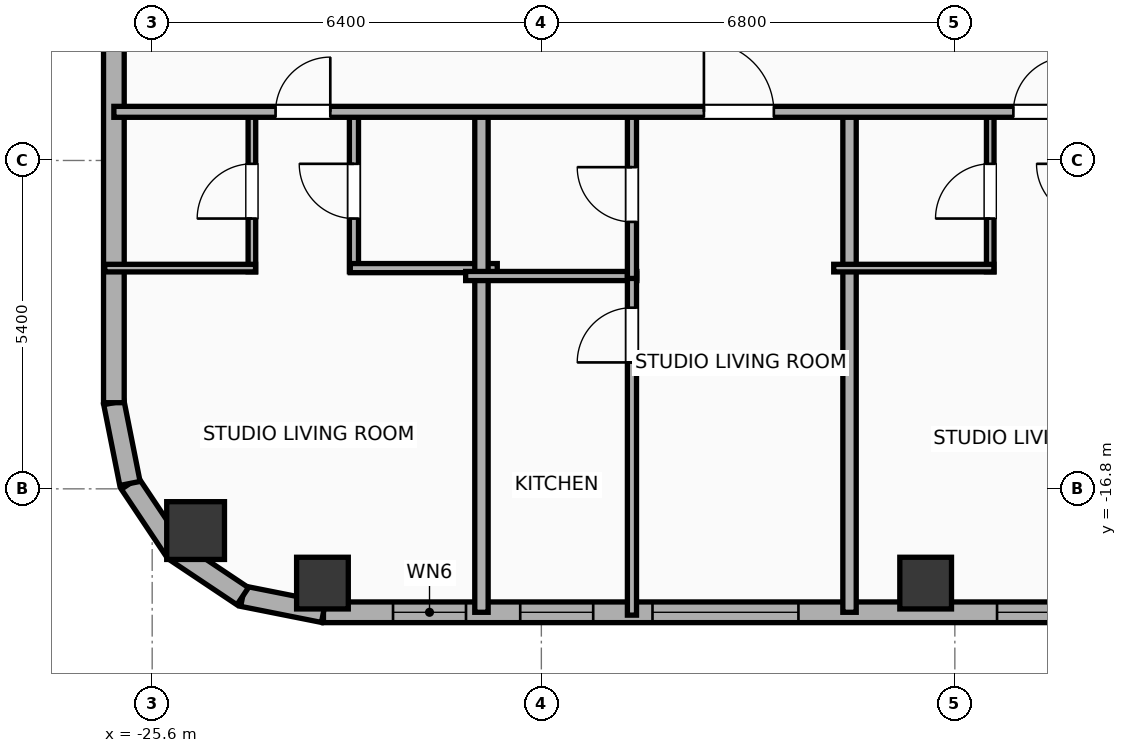
"""IFC4 building model, lengths in metres.
Left out: names, types, materials, properties, quantities, classifications, styles, units other than length and angle.
Written with IfcOpenShell. Run it as: python <this file> out.ifc"""

import sys

from ifc_helpers import new_model, si_unit, direction, frame, frame_2d, origin, origin_2d, place, context, subcontext, project, spatial, rectangle, hollow_rectangle, hollow_circle, extrude, element, fill, save


model = new_model("IFC4")
c1 = context("Model", 3, precision=1e-05, world=origin(), true_north=direction((0.0, 1.0)))
c2 = subcontext(c1, "Body", "Model", "MODEL_VIEW")
j1 = project(units=[si_unit("LENGTHUNIT", "METRE"), si_unit("PLANEANGLEUNIT", "RADIAN")], contexts=[c1])
p1 = place(None, origin())
s1 = spatial("IfcSite", under=j1, at=p1, CompositionType="ELEMENT")
p2 = place(p1, origin())
s2 = spatial("IfcBuilding", under=s1, at=p2, CompositionType="ELEMENT")
p3 = place(p2, frame((0.0, 0.0, 247.0)))
s3 = spatial("IfcBuildingStorey", under=s2, at=p3, CompositionType="ELEMENT", Elevation=247.0)
for number, where, z_axis, x_axis in (
    (1, (-22.8, -18.35, 0.0), (0.0, 0.0, 1.0), (1.0, 0.0, 0.0)),
    (2, (-12.88, -18.35, 0.0), (0.0, 0.0, 1.0), (1.0, 0.0, 0.0)),
):
    element("IfcColumn", number, at=place(p3, frame(where, z_axis=z_axis, x_axis=x_axis)), inside=s3, PredefinedType="COLUMN", context=c2, shape_type="SweptSolid", body=[
        extrude(hollow_rectangle(XDim=0.85, YDim=0.85, WallThickness=0.028, at=origin_2d()), origin(), (0.0, 0.0, 1.0), 3.9),
    ])
p4 = place(p3, frame((-24.886, -17.486, 0.0), z_axis=(0.0, 0.0, 1.0), x_axis=(1.0, 0.0, 0.0)))
e3 = element("IfcColumn", 3, at=p4, inside=s3, PredefinedType="COLUMN", context=c2, shape_type="SweptSolid", body=[
    extrude(hollow_circle(Radius=0.475, WallThickness=0.032, at=origin_2d()), origin(), (0.0, 0.0, 1.0), 3.9),
])
p5 = place(p3, frame((26.783, -18.83, 0.0), z_axis=(0.0, 0.0, 1.0), x_axis=(-1.0, 0.0, 0.0)))
e4 = element("IfcWall", 4, at=p5, inside=s3, PredefinedType="ELEMENTEDWALL", context=c2, shape_type="SweptSolid", body=[
    extrude(rectangle(XDim=49.566, YDim=0.34, at=frame_2d((24.783, 0.0))), origin(), (0.0, 0.0, 1.0), 3.65),
])
p6 = place(p5, frame((23.583, 0.0, 0.75)))
e5 = element("IfcOpeningElement", 5, at=p6, cuts=e4, PredefinedType="OPENING", context=c2, shape_type="SweptSolid", body=[
    extrude(rectangle(XDim=2.4, YDim=2.1, at=frame_2d((1.2, 1.05))), frame((0.0, 0.18, 0.0), z_axis=(0.0, -1.0, 0.0), x_axis=(1.0, 0.0, 0.0)), (0.0, 0.0, 1.0), 0.36),
])
p7 = place(p5, frame((41.756, 0.0, 0.75)))
e6 = element("IfcOpeningElement", 6, at=p7, cuts=e4, PredefinedType="OPENING", context=c2, shape_type="SweptSolid", body=[
    extrude(rectangle(XDim=2.4, YDim=2.1, at=frame_2d((1.2, 1.05))), frame((0.0, 0.18, 0.0), z_axis=(0.0, -1.0, 0.0), x_axis=(1.0, 0.0, 0.0)), (0.0, 0.0, 1.0), 0.36),
])
p8 = place(p5, frame((47.222, 0.0, 0.75)))
e7 = element("IfcOpeningElement", 7, at=p8, cuts=e4, PredefinedType="OPENING", context=c2, shape_type="SweptSolid", body=[
    extrude(rectangle(XDim=1.2, YDim=2.05, at=frame_2d((0.6, 1.025))), frame((0.0, 0.18, 0.0), z_axis=(0.0, -1.0, 0.0), x_axis=(1.0, 0.0, 0.0)), (0.0, 0.0, 1.0), 0.36),
])
p9 = place(p5, frame((45.131, 0.0, 0.75)))
e8 = element("IfcOpeningElement", 8, at=p9, cuts=e4, PredefinedType="OPENING", context=c2, shape_type="SweptSolid", body=[
    extrude(rectangle(XDim=1.2, YDim=2.05, at=frame_2d((0.6, 1.025))), frame((0.0, 0.18, 0.0), z_axis=(0.0, -1.0, 0.0), x_axis=(1.0, 0.0, 0.0)), (0.0, 0.0, 1.0), 0.36),
])
p10 = place(p5, frame((37.289, 0.0, 0.75)))
e9 = element("IfcOpeningElement", 9, at=p10, cuts=e4, PredefinedType="OPENING", context=c2, shape_type="SweptSolid", body=[
    extrude(rectangle(XDim=1.2, YDim=2.05, at=frame_2d((0.6, 1.025))), frame((0.0, 0.18, 0.0), z_axis=(0.0, -1.0, 0.0), x_axis=(1.0, 0.0, 0.0)), (0.0, 0.0, 1.0), 0.36),
])
p11 = place(p5, frame((15.715, 0.0, 0.75)))
e10 = element("IfcOpeningElement", 10, at=p11, cuts=e4, PredefinedType="OPENING", context=c2, shape_type="SweptSolid", body=[
    extrude(rectangle(XDim=1.2, YDim=2.05, at=frame_2d((0.6, 1.025))), frame((0.0, 0.18, 0.0), z_axis=(0.0, -1.0, 0.0), x_axis=(1.0, 0.0, 0.0)), (0.0, 0.0, 1.0), 0.36),
])
p12 = place(p5, frame((12.022, 0.0, 0.75)))
e11 = element("IfcOpeningElement", 11, at=p12, cuts=e4, PredefinedType="OPENING", context=c2, shape_type="SweptSolid", body=[
    extrude(rectangle(XDim=1.2, YDim=2.05, at=frame_2d((0.6, 1.025))), frame((0.0, 0.18, 0.0), z_axis=(0.0, -1.0, 0.0), x_axis=(1.0, 0.0, 0.0)), (0.0, 0.0, 1.0), 0.36),
])
p13 = place(p5, frame((8.09, 0.0, 0.75)))
e12 = element("IfcOpeningElement", 12, at=p13, cuts=e4, PredefinedType="OPENING", context=c2, shape_type="SweptSolid", body=[
    extrude(rectangle(XDim=1.2, YDim=2.05, at=frame_2d((0.6, 1.025))), frame((0.0, 0.18, 0.0), z_axis=(0.0, -1.0, 0.0), x_axis=(1.0, 0.0, 0.0)), (0.0, 0.0, 1.0), 0.36),
])
p14 = place(p5, frame((4.637, 0.0, 0.75)))
e13 = element("IfcOpeningElement", 13, at=p14, cuts=e4, PredefinedType="OPENING", context=c2, shape_type="SweptSolid", body=[
    extrude(rectangle(XDim=1.2, YDim=2.05, at=frame_2d((0.6, 1.025))), frame((0.0, 0.18, 0.0), z_axis=(0.0, -1.0, 0.0), x_axis=(1.0, 0.0, 0.0)), (0.0, 0.0, 1.0), 0.36),
])
p15 = place(p5, frame((1.811, 0.0, 0.75)))
e14 = element("IfcOpeningElement", 14, at=p15, cuts=e4, PredefinedType="OPENING", context=c2, shape_type="SweptSolid", body=[
    extrude(rectangle(XDim=1.2, YDim=2.05, at=frame_2d((0.6, 1.025))), frame((0.0, 0.18, 0.0), z_axis=(0.0, -1.0, 0.0), x_axis=(1.0, 0.0, 0.0)), (0.0, 0.0, 1.0), 0.36),
])
p16 = place(p5, frame((32.253, 0.0, 0.75)))
e15 = element("IfcOpeningElement", 15, at=p16, cuts=e4, PredefinedType="OPENING", context=c2, shape_type="SweptSolid", body=[
    extrude(rectangle(XDim=1.2, YDim=2.05, at=frame_2d((0.6, 1.025))), frame((0.0, 0.18, 0.0), z_axis=(0.0, -1.0, 0.0), x_axis=(1.0, 0.0, 0.0)), (0.0, 0.0, 1.0), 0.36),
])
p17 = place(p5, frame((27.853, 0.0, 0.75)))
e16 = element("IfcOpeningElement", 16, at=p17, cuts=e4, PredefinedType="OPENING", context=c2, shape_type="SweptSolid", body=[
    extrude(rectangle(XDim=1.2, YDim=2.05, at=frame_2d((0.6, 1.025))), frame((0.0, 0.18, 0.0), z_axis=(0.0, -1.0, 0.0), x_axis=(1.0, 0.0, 0.0)), (0.0, 0.0, 1.0), 0.36),
])
p18 = place(p5, frame((20.473, 0.0, 0.75)))
e17 = element("IfcOpeningElement", 17, at=p18, cuts=e4, PredefinedType="OPENING", context=c2, shape_type="SweptSolid", body=[
    extrude(rectangle(XDim=1.2, YDim=2.05, at=frame_2d((0.6, 1.025))), frame((0.0, 0.18, 0.0), z_axis=(0.0, -1.0, 0.0), x_axis=(1.0, 0.0, 0.0)), (0.0, 0.0, 1.0), 0.36),
])
p19 = place(p3, frame((-22.783, -18.83, 0.0), z_axis=(0.0, 0.0, 1.0), x_axis=(-0.980788153188, 0.195075878998, 0.0)))
e18 = element("IfcWall", 18, at=p19, inside=s3, PredefinedType="ELEMENTEDWALL", context=c2, shape_type="SweptSolid", body=[
    extrude(rectangle(XDim=1.354, YDim=0.34, at=frame_2d((0.677, 0.0))), origin(), (0.0, 0.0, 1.0), 3.65),
])
p20 = place(p3, frame((-24.111, -18.566, 0.0), z_axis=(0.0, 0.0, 1.0), x_axis=(-0.831403586725, 0.555669034571, 0.0)))
e19 = element("IfcWall", 19, at=p20, inside=s3, PredefinedType="ELEMENTEDWALL", context=c2, shape_type="SweptSolid", body=[
    extrude(rectangle(XDim=1.337, YDim=0.34, at=frame_2d((0.668, 0.0))), origin(), (0.0, 0.0, 1.0), 3.65),
])
p21 = place(p3, frame((-25.223, -17.823, 0.0), z_axis=(0.0, 0.0, 1.0), x_axis=(-0.555584683399, 0.831459956686, 0.0)))
e20 = element("IfcWall", 20, at=p21, inside=s3, PredefinedType="ELEMENTEDWALL", context=c2, shape_type="SweptSolid", body=[
    extrude(rectangle(XDim=1.337, YDim=0.34, at=frame_2d((0.668, 0.0))), origin(), (0.0, 0.0, 1.0), 3.65),
])
p22 = place(p3, frame((-25.966, -16.711, 0.0), z_axis=(0.0, 0.0, 1.0), x_axis=(-0.195110379894, 0.98078129043, 0.0)))
e21 = element("IfcWall", 21, at=p22, inside=s3, PredefinedType="ELEMENTEDWALL", context=c2, shape_type="SweptSolid", body=[
    extrude(rectangle(XDim=1.354, YDim=0.34, at=frame_2d((0.677, 0.0))), origin(), (0.0, 0.0, 1.0), 3.65),
])
p23 = place(p3, frame((-26.23, -15.383, 0.0), z_axis=(0.0, 0.0, 1.0), x_axis=(0.0, 1.0, 0.0)))
e22 = element("IfcWall", 22, at=p23, inside=s3, PredefinedType="ELEMENTEDWALL", context=c2, shape_type="SweptSolid", body=[
    extrude(rectangle(XDim=31.967, YDim=0.34, at=frame_2d((15.983, 0.0))), origin(), (0.0, 0.0, 1.0), 3.65),
])
p24 = place(p23, frame((29.21, 0.0, 0.75)))
e23 = element("IfcOpeningElement", 23, at=p24, cuts=e22, PredefinedType="OPENING", context=c2, shape_type="SweptSolid", body=[
    extrude(rectangle(XDim=1.2, YDim=2.05, at=frame_2d((0.6, 1.025))), frame((0.0, 0.18, 0.0), z_axis=(0.0, -1.0, 0.0), x_axis=(1.0, 0.0, 0.0)), (0.0, 0.0, 1.0), 0.36),
])
p25 = place(p23, frame((19.378, 0.0, 0.75)))
e24 = element("IfcOpeningElement", 24, at=p25, cuts=e22, PredefinedType="OPENING", context=c2, shape_type="SweptSolid", body=[
    extrude(rectangle(XDim=1.2, YDim=2.05, at=frame_2d((0.6, 1.025))), frame((0.0, 0.18, 0.0), z_axis=(0.0, -1.0, 0.0), x_axis=(1.0, 0.0, 0.0)), (0.0, 0.0, 1.0), 0.36),
])
p26 = place(p23, frame((10.328, 0.0, 0.75)))
e25 = element("IfcOpeningElement", 25, at=p26, cuts=e22, PredefinedType="OPENING", context=c2, shape_type="SweptSolid", body=[
    extrude(rectangle(XDim=1.2, YDim=2.05, at=frame_2d((0.6, 1.025))), frame((0.0, 0.18, 0.0), z_axis=(0.0, -1.0, 0.0), x_axis=(1.0, 0.0, 0.0)), (0.0, 0.0, 1.0), 0.36),
])
p27 = place(p3, frame((-23.96, -13.23, 0.0), z_axis=(0.0, 0.0, 1.0), x_axis=(0.0, 1.0, 0.0)))
e26 = element("IfcWall", 26, at=p27, inside=s3, PredefinedType="PARTITIONING", context=c2, shape_type="SweptSolid", body=[
    extrude(rectangle(XDim=2.65, YDim=0.125, at=frame_2d((1.325, 0.0))), origin(), (0.0, 0.0, 1.0), 3.65),
])
p28 = place(p27, frame((0.875, 0.0, 0.0)))
e27 = element("IfcOpeningElement", 27, at=p28, cuts=e26, PredefinedType="OPENING", context=c2, shape_type="SweptSolid", body=[
    extrude(rectangle(XDim=0.9, YDim=2.05, at=frame_2d((0.45, 1.025))), frame((0.0, 0.073, 0.0), z_axis=(0.0, -1.0, 0.0), x_axis=(1.0, 0.0, 0.0)), (0.0, 0.0, 1.0), 0.145),
])
p29 = place(p3, frame((-22.282, -13.23, 0.0), z_axis=(0.0, 0.0, 1.0), x_axis=(0.0, 1.0, 0.0)))
e28 = element("IfcWall", 28, at=p29, inside=s3, PredefinedType="PLUMBINGWALL", context=c2, shape_type="SweptSolid", body=[
    extrude(rectangle(XDim=2.65, YDim=0.15, at=frame_2d((1.325, 0.0))), origin(), (0.0, 0.0, 1.0), 3.65),
])
p30 = place(p29, frame((0.875, 0.0, 0.0)))
e29 = element("IfcOpeningElement", 29, at=p30, cuts=e28, PredefinedType="OPENING", context=c2, shape_type="SweptSolid", body=[
    extrude(rectangle(XDim=0.9, YDim=2.05, at=frame_2d((0.45, 1.025))), frame((0.0, 0.085, 0.0), z_axis=(0.0, -1.0, 0.0), x_axis=(1.0, 0.0, 0.0)), (0.0, 0.0, 1.0), 0.17),
])
p31 = place(p3, frame((-26.38, -13.17, 0.0), z_axis=(0.0, 0.0, 1.0), x_axis=(1.0, 0.0, 0.0)))
e30 = element("IfcWall", 30, at=p31, inside=s3, PredefinedType="PARTITIONING", context=c2, shape_type="SweptSolid", body=[
    extrude(rectangle(XDim=2.48, YDim=0.125, at=frame_2d((1.24, 0.0))), origin(), (0.0, 0.0, 1.0), 3.65),
])
p32 = place(p3, frame((-22.342, -13.17, 0.0), z_axis=(0.0, 0.0, 1.0), x_axis=(1.0, 0.0, 0.0)))
e31 = element("IfcWall", 31, at=p32, inside=s3, PredefinedType="PLUMBINGWALL", context=c2, shape_type="SweptSolid", body=[
    extrude(rectangle(XDim=2.417, YDim=0.15, at=frame_2d((1.208, 0.0))), origin(), (0.0, 0.0, 1.0), 3.65),
])
p33 = place(p3, frame((-20.185, -18.83, 0.0), z_axis=(0.0, 0.0, 1.0), x_axis=(0.0, 1.0, 0.0)))
e32 = element("IfcWall", 32, at=p33, inside=s3, PredefinedType="PARTITIONING", context=c2, shape_type="SweptSolid", body=[
    extrude(rectangle(XDim=8.31, YDim=0.22, at=frame_2d((4.155, 0.0))), origin(), (0.0, 0.0, 1.0), 3.09),
])
p34 = place(p3, frame((-20.445, -13.3, 0.0), z_axis=(0.0, 0.0, 1.0), x_axis=(1.0, 0.0, 0.0)))
e33 = element("IfcWall", 33, at=p34, inside=s3, PredefinedType="PLUMBINGWALL", context=c2, shape_type="SweptSolid", body=[
    extrude(rectangle(XDim=2.815, YDim=0.15, at=frame_2d((1.408, 0.0))), origin(), (0.0, 0.0, 1.0), 3.65),
])
p35 = place(p3, frame((-17.71, -18.877, 0.0), z_axis=(0.0, 0.0, 1.0), x_axis=(0.0, 1.0, 0.0)))
e34 = element("IfcWall", 34, at=p35, inside=s3, PredefinedType="PLUMBINGWALL", context=c2, shape_type="SweptSolid", body=[
    extrude(rectangle(XDim=5.617, YDim=0.15, at=frame_2d((2.808, 0.0))), origin(), (0.0, 0.0, 1.0), 3.65),
])
p36 = place(p35, frame((4.156, 0.0, 0.0)))
e35 = element("IfcOpeningElement", 35, at=p36, cuts=e34, PredefinedType="OPENING", context=c2, shape_type="SweptSolid", body=[
    extrude(rectangle(XDim=0.9, YDim=2.05, at=frame_2d((0.45, 1.025))), frame((0.0, 0.085, 0.0), z_axis=(0.0, -1.0, 0.0), x_axis=(1.0, 0.0, 0.0)), (0.0, 0.0, 1.0), 0.17),
])
p37 = place(p3, frame((-17.71, -13.34, 0.0), z_axis=(0.0, 0.0, 1.0), x_axis=(0.0, 1.0, 0.0)))
e36 = element("IfcWall", 36, at=p37, inside=s3, PredefinedType="PLUMBINGWALL", context=c2, shape_type="SweptSolid", body=[
    extrude(rectangle(XDim=2.76, YDim=0.15, at=frame_2d((1.38, 0.0))), origin(), (0.0, 0.0, 1.0), 3.65),
])
p38 = place(p37, frame((0.93, 0.0, 0.0)))
e37 = element("IfcOpeningElement", 37, at=p38, cuts=e36, PredefinedType="OPENING", context=c2, shape_type="SweptSolid", body=[
    extrude(rectangle(XDim=0.9, YDim=2.05, at=frame_2d((0.45, 1.025))), frame((0.0, 0.085, 0.0), z_axis=(0.0, -1.0, 0.0), x_axis=(1.0, 0.0, 0.0)), (0.0, 0.0, 1.0), 0.17),
])
p39 = place(p3, frame((-14.132, -18.83, 0.0), z_axis=(0.0, 0.0, 1.0), x_axis=(0.0, 1.0, 0.0)))
e38 = element("IfcWall", 38, at=p39, inside=s3, PredefinedType="PARTITIONING", context=c2, shape_type="SweptSolid", body=[
    extrude(rectangle(XDim=8.31, YDim=0.22, at=frame_2d((4.155, 0.0))), origin(), (0.0, 0.0, 1.0), 3.65),
])
p40 = place(p3, frame((-11.818, -13.23, 0.0), z_axis=(0.0, 0.0, 1.0), x_axis=(0.0, 1.0, 0.0)))
e39 = element("IfcWall", 39, at=p40, inside=s3, PredefinedType="PARTITIONING", context=c2, shape_type="SweptSolid", body=[
    extrude(rectangle(XDim=2.65, YDim=0.125, at=frame_2d((1.325, 0.0))), origin(), (0.0, 0.0, 1.0), 3.65),
])
p41 = place(p40, frame((0.875, 0.0, 0.0)))
e40 = element("IfcOpeningElement", 40, at=p41, cuts=e39, PredefinedType="OPENING", context=c2, shape_type="SweptSolid", body=[
    extrude(rectangle(XDim=0.9, YDim=2.05, at=frame_2d((0.45, 1.025))), frame((0.0, 0.073, 0.0), z_axis=(0.0, -1.0, 0.0), x_axis=(1.0, 0.0, 0.0)), (0.0, 0.0, 1.0), 0.145),
])
p42 = place(p3, frame((-14.392, -13.17, 0.0), z_axis=(0.0, 0.0, 1.0), x_axis=(1.0, 0.0, 0.0)))
e41 = element("IfcWall", 41, at=p42, inside=s3, PredefinedType="PARTITIONING", context=c2, shape_type="SweptSolid", body=[
    extrude(rectangle(XDim=2.634, YDim=0.125, at=frame_2d((1.317, 0.0))), origin(), (0.0, 0.0, 1.0), 3.65),
])
p43 = place(p3, frame((-26.23, -10.6, 0.0), z_axis=(0.0, 0.0, 1.0), x_axis=(1.0, 0.0, 0.0)))
e42 = element("IfcWall", 42, at=p43, inside=s3, PredefinedType="PARTITIONING", context=c2, shape_type="SweptSolid", body=[
    extrude(rectangle(XDim=18.15, YDim=0.18, at=frame_2d((9.075, 0.0))), origin(), (0.0, 0.0, 1.0), 3.65),
])
p44 = place(p43, frame((2.659, 0.0, 0.0)))
e43 = element("IfcOpeningElement", 43, at=p44, cuts=e42, PredefinedType="OPENING", context=c2, shape_type="SweptSolid", body=[
    extrude(rectangle(XDim=0.9, YDim=2.05, at=frame_2d((0.45, 1.025))), frame((0.0, 0.1, 0.0), z_axis=(0.0, -1.0, 0.0), x_axis=(1.0, 0.0, 0.0)), (0.0, 0.0, 1.0), 0.2),
])
p45 = place(p43, frame((9.703, 0.0, 0.0)))
e44 = element("IfcOpeningElement", 44, at=p45, cuts=e42, PredefinedType="OPENING", context=c2, shape_type="SweptSolid", body=[
    extrude(rectangle(XDim=1.15, YDim=2.05, at=frame_2d((0.575, 1.025))), frame((0.0, 0.1, 0.0), z_axis=(0.0, -1.0, 0.0), x_axis=(1.0, 0.0, 0.0)), (0.0, 0.0, 1.0), 0.2),
])
p46 = place(p43, frame((14.792, 0.0, 0.0)))
e45 = element("IfcOpeningElement", 45, at=p46, cuts=e42, PredefinedType="OPENING", context=c2, shape_type="SweptSolid", body=[
    extrude(rectangle(XDim=0.9, YDim=2.05, at=frame_2d((0.45, 1.025))), frame((0.0, 0.1, 0.0), z_axis=(0.0, -1.0, 0.0), x_axis=(1.0, 0.0, 0.0)), (0.0, 0.0, 1.0), 0.2),
])
p47 = place(p7, origin())
e46 = element("IfcWindow", 46, at=p47, inside=s3, PartitioningType="SINGLE_PANEL", PredefinedType="WINDOW", context=c2, shape_type="SweptSolid", body=[
    extrude(rectangle(XDim=2.4, YDim=2.1, at=frame_2d((1.2, 1.05))), frame((0.0, 0.03, 0.0), z_axis=(0.0, -1.0, 0.0), x_axis=(1.0, 0.0, 0.0)), (0.0, 0.0, 1.0), 0.06),
])
fill(e6, e46)
p48 = place(p8, origin())
e47 = element("IfcWindow", 47, at=p48, inside=s3, PartitioningType="SINGLE_PANEL", PredefinedType="WINDOW", context=c2, shape_type="SweptSolid", body=[
    extrude(rectangle(XDim=1.2, YDim=2.05, at=frame_2d((0.6, 1.025))), frame((0.0, 0.03, 0.0), z_axis=(0.0, -1.0, 0.0), x_axis=(1.0, 0.0, 0.0)), (0.0, 0.0, 1.0), 0.06),
])
fill(e7, e47)
p49 = place(p9, origin())
e48 = element("IfcWindow", 48, at=p49, inside=s3, PartitioningType="SINGLE_PANEL", PredefinedType="WINDOW", context=c2, shape_type="SweptSolid", body=[
    extrude(rectangle(XDim=1.2, YDim=2.05, at=frame_2d((0.6, 1.025))), frame((0.0, 0.03, 0.0), z_axis=(0.0, -1.0, 0.0), x_axis=(1.0, 0.0, 0.0)), (0.0, 0.0, 1.0), 0.06),
])
fill(e8, e48)
p50 = place(p10, origin())
e49 = element("IfcWindow", 49, at=p50, inside=s3, PartitioningType="SINGLE_PANEL", PredefinedType="WINDOW", context=c2, shape_type="SweptSolid", body=[
    extrude(rectangle(XDim=1.2, YDim=2.05, at=frame_2d((0.6, 1.025))), frame((0.0, 0.03, 0.0), z_axis=(0.0, -1.0, 0.0), x_axis=(1.0, 0.0, 0.0)), (0.0, 0.0, 1.0), 0.06),
])
fill(e9, e49)
p51 = place(p28, origin())
e50 = element("IfcDoor", 50, at=p51, inside=s3, OperationType="SINGLE_SWING_LEFT", PredefinedType="DOOR", context=c2, shape_type="SweptSolid", body=[
    extrude(rectangle(XDim=0.9, YDim=2.05, at=frame_2d((0.45, 1.025))), frame((0.0, 0.025, 0.0), z_axis=(0.0, -1.0, 0.0), x_axis=(1.0, 0.0, 0.0)), (0.0, 0.0, 1.0), 0.05),
])
fill(e27, e50)
p52 = place(p30, origin())
e51 = element("IfcDoor", 51, at=p52, inside=s3, OperationType="SINGLE_SWING_RIGHT", PredefinedType="DOOR", context=c2, shape_type="SweptSolid", body=[
    extrude(rectangle(XDim=0.9, YDim=2.05, at=frame_2d((0.45, 1.025))), frame((0.0, 0.025, 0.0), z_axis=(0.0, -1.0, 0.0), x_axis=(1.0, 0.0, 0.0)), (0.0, 0.0, 1.0), 0.05),
])
fill(e29, e51)
p53 = place(p36, origin())
e52 = element("IfcDoor", 52, at=p53, inside=s3, OperationType="SINGLE_SWING_LEFT", PredefinedType="DOOR", context=c2, shape_type="SweptSolid", body=[
    extrude(rectangle(XDim=0.9, YDim=2.05, at=frame_2d((0.45, 1.025))), frame((0.0, 0.025, 0.0), z_axis=(0.0, -1.0, 0.0), x_axis=(1.0, 0.0, 0.0)), (0.0, 0.0, 1.0), 0.05),
])
fill(e35, e52)
p54 = place(p38, origin())
e53 = element("IfcDoor", 53, at=p54, inside=s3, OperationType="SINGLE_SWING_RIGHT", PredefinedType="DOOR", context=c2, shape_type="SweptSolid", body=[
    extrude(rectangle(XDim=0.9, YDim=2.05, at=frame_2d((0.45, 1.025))), frame((0.0, 0.025, 0.0), z_axis=(0.0, -1.0, 0.0), x_axis=(1.0, 0.0, 0.0)), (0.0, 0.0, 1.0), 0.05),
])
fill(e37, e53)
p55 = place(p41, origin())
e54 = element("IfcDoor", 54, at=p55, inside=s3, OperationType="SINGLE_SWING_LEFT", PredefinedType="DOOR", context=c2, shape_type="SweptSolid", body=[
    extrude(rectangle(XDim=0.9, YDim=2.05, at=frame_2d((0.45, 1.025))), frame((0.0, 0.025, 0.0), z_axis=(0.0, -1.0, 0.0), x_axis=(1.0, 0.0, 0.0)), (0.0, 0.0, 1.0), 0.05),
])
fill(e40, e54)
p56 = place(p44, origin())
e55 = element("IfcDoor", 55, at=p56, inside=s3, OperationType="SINGLE_SWING_RIGHT", PredefinedType="DOOR", context=c2, shape_type="SweptSolid", body=[
    extrude(rectangle(XDim=0.9, YDim=2.05, at=frame_2d((0.45, 1.025))), frame((0.0, 0.025, 0.0), z_axis=(0.0, -1.0, 0.0), x_axis=(1.0, 0.0, 0.0)), (0.0, 0.0, 1.0), 0.05),
])
fill(e43, e55)
p57 = place(p45, origin())
e56 = element("IfcDoor", 56, at=p57, inside=s3, OperationType="SINGLE_SWING_LEFT", PredefinedType="DOOR", context=c2, shape_type="SweptSolid", body=[
    extrude(rectangle(XDim=1.15, YDim=2.05, at=frame_2d((0.575, 1.025))), frame((0.0, 0.025, 0.0), z_axis=(0.0, -1.0, 0.0), x_axis=(1.0, 0.0, 0.0)), (0.0, 0.0, 1.0), 0.05),
])
fill(e44, e56)
p58 = place(p46, origin())
e57 = element("IfcDoor", 57, at=p58, inside=s3, OperationType="SINGLE_SWING_RIGHT", PredefinedType="DOOR", context=c2, shape_type="SweptSolid", body=[
    extrude(rectangle(XDim=0.9, YDim=2.05, at=frame_2d((0.45, 1.025))), frame((0.0, 0.025, 0.0), z_axis=(0.0, -1.0, 0.0), x_axis=(1.0, 0.0, 0.0)), (0.0, 0.0, 1.0), 0.05),
])
fill(e45, e57)
save(model, sys.argv[1])
